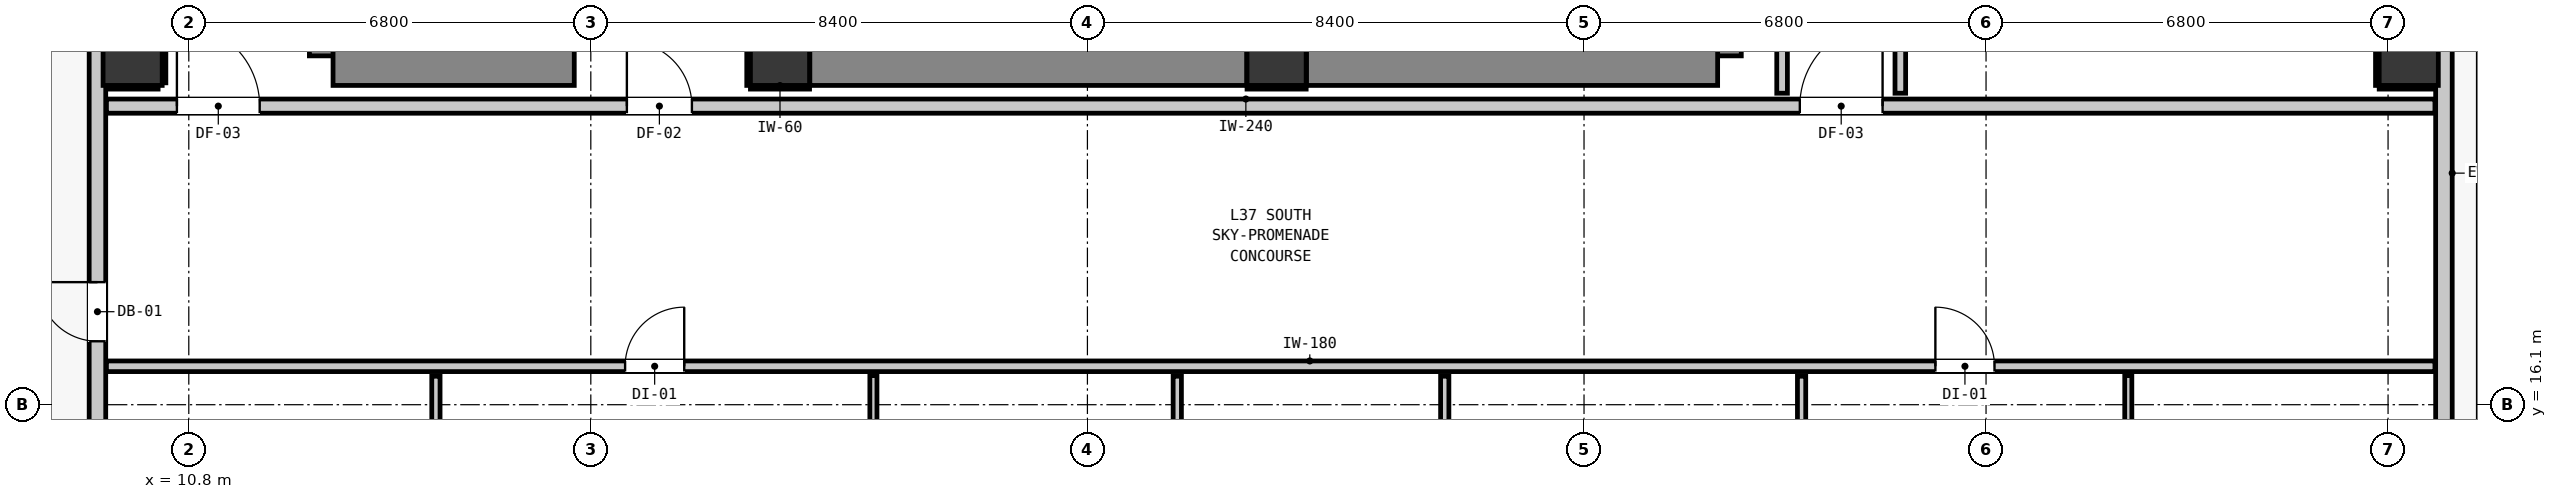
"""IFC4 building model, lengths in metres.
Left out: names, types, materials, properties, quantities, classifications, styles, units other than length and angle.
Written with IfcOpenShell. Run it as: python <this file> out.ifc"""

import sys

from ifc_helpers import new_model, si_unit, direction, frame, frame_2d, origin, origin_2d, place, context, subcontext, project, spatial, rectangle, extrude, element, fill, save


model = new_model("IFC4")
c1 = context("Model", 3, precision=1e-05, world=origin(), true_north=direction((0.0, 1.0)))
c2 = subcontext(c1, "Body", "Model", "MODEL_VIEW")
j1 = project(units=[si_unit("LENGTHUNIT", "METRE"), si_unit("PLANEANGLEUNIT", "RADIAN")], contexts=[c1])
p1 = place(None, origin())
s1 = spatial("IfcSite", under=j1, at=p1, CompositionType="ELEMENT")
p2 = place(p1, origin())
s2 = spatial("IfcBuilding", under=s1, at=p2, CompositionType="ELEMENT")
p3 = place(p2, frame((0.0, 0.0, 129.32)))
s3 = spatial("IfcBuildingStorey", under=s2, at=p3, CompositionType="ELEMENT", Elevation=129.32)
for number, where, z_axis, x_axis in (
    (1, (20.8, 22.0, 0.0), (0.0, 0.0, 1.0), (1.0, 0.0, 0.0)),
    (2, (29.2, 22.0, 0.0), (0.0, 0.0, 1.0), (1.0, 0.0, 0.0)),
):
    element("IfcColumn", number, at=place(p3, frame(where, z_axis=z_axis, x_axis=x_axis)), inside=s3, PredefinedType="COLUMN", context=c2, shape_type="SweptSolid", body=[
        extrude(rectangle(XDim=1.0, YDim=1.0, at=origin_2d()), origin(), (0.0, 0.0, 1.0), 3.32),
    ])
p4 = place(p3, frame((13.34, 22.0, 0.0), z_axis=(0.0, 0.0, 1.0), x_axis=(0.0, 1.0, 0.0)))
e3 = element("IfcWall", 3, at=p4, inside=s3, PredefinedType="SHEAR", context=c2, shape_type="SweptSolid", body=[
    extrude(rectangle(XDim=8.195, YDim=1.0, at=frame_2d((4.098, 0.0))), origin(), (0.0, 0.0, 1.0), 3.32),
])
p5 = place(p3, frame((13.24, 22.0, 0.0), z_axis=(0.0, 0.0, 1.0), x_axis=(1.0, 0.0, 0.0)))
e4 = element("IfcWall", 4, at=p5, inside=s3, PredefinedType="SHEAR", context=c2, shape_type="SweptSolid", body=[
    extrude(rectangle(XDim=4.08, YDim=1.0, at=frame_2d((2.04, 0.0))), origin(), (0.0, 0.0, 1.0), 3.32),
])
p6 = place(p3, frame((36.56, 22.0, 0.0), z_axis=(0.0, 0.0, 1.0), x_axis=(0.0, 1.0, 0.0)))
e5 = element("IfcWall", 5, at=p6, inside=s3, PredefinedType="SHEAR", context=c2, shape_type="SweptSolid", body=[
    extrude(rectangle(XDim=8.195, YDim=1.0, at=frame_2d((4.098, 0.0))), origin(), (0.0, 0.0, 1.0), 3.32),
])
p7 = place(p3, frame((29.705, 22.0, 0.0), z_axis=(0.0, 0.0, 1.0), x_axis=(1.0, 0.0, 0.0)))
e6 = element("IfcWall", 6, at=p7, inside=s3, PredefinedType="SHEAR", context=c2, shape_type="SweptSolid", body=[
    extrude(rectangle(XDim=6.955, YDim=1.0, at=frame_2d((3.478, 0.0))), origin(), (0.0, 0.0, 1.0), 3.32),
])
p8 = place(p3, frame((21.305, 22.0, 0.0), z_axis=(0.0, 0.0, 1.0), x_axis=(1.0, 0.0, 0.0)))
e7 = element("IfcWall", 7, at=p8, inside=s3, PredefinedType="SHEAR", context=c2, shape_type="SweptSolid", body=[
    extrude(rectangle(XDim=7.39, YDim=1.0, at=frame_2d((3.695, 0.0))), origin(), (0.0, 0.0, 1.0), 3.32),
])
for number, where, z_axis, x_axis in (
    (8, (9.85, 22.0, 0.0), (0.0, 0.0, 1.0), (1.0, 0.0, 0.0)),
    (9, (48.35, 22.0, 0.0), (0.0, 0.0, 1.0), (1.0, 0.0, 0.0)),
):
    element("IfcColumn", number, at=place(p3, frame(where, z_axis=z_axis, x_axis=x_axis)), inside=s3, PredefinedType="COLUMN", context=c2, shape_type="SweptSolid", body=[
        extrude(rectangle(XDim=1.0, YDim=1.0, at=origin_2d()), origin(), (0.0, 0.0, 1.0), 3.32),
    ])
p9 = place(p3, frame((9.255, 11.355, 0.0), z_axis=(0.0, 0.0, 1.0), x_axis=(0.0, 1.0, 0.0)))
e10 = element("IfcWall", 10, at=p9, inside=s3, PredefinedType="STANDARD", context=c2, shape_type="SweptSolid", body=[
    extrude(rectangle(XDim=32.29, YDim=0.28, at=frame_2d((16.145, 0.0))), origin(), (0.0, 0.0, 1.0), 3.08),
])
p10 = place(p9, frame((5.818, 0.0, 0.0)))
e11 = element("IfcOpeningElement", 11, at=p10, cuts=e10, PredefinedType="OPENING", context=c2, shape_type="SweptSolid", body=[
    extrude(rectangle(XDim=1.0, YDim=2.15, at=frame_2d((0.5, 1.075))), frame((0.0, 0.15, 0.0), z_axis=(0.0, -1.0, 0.0), x_axis=(1.0, 0.0, 0.0)), (0.0, 0.0, 1.0), 0.3),
])
p11 = place(p9, frame((0.544, 0.0, 0.85)))
e12 = element("IfcOpeningElement", 12, at=p11, cuts=e10, PredefinedType="OPENING", context=c2, shape_type="SweptSolid", body=[
    extrude(rectangle(XDim=1.05, YDim=1.65, at=frame_2d((0.525, 0.825))), frame((0.0, 0.15, 0.0), z_axis=(0.0, -1.0, 0.0), x_axis=(1.0, 0.0, 0.0)), (0.0, 0.0, 1.0), 0.3),
])
p12 = place(p3, frame((48.945, 43.645, 0.0), z_axis=(0.0, 0.0, 1.0), x_axis=(0.0, -1.0, 0.0)))
e13 = element("IfcWall", 13, at=p12, inside=s3, PredefinedType="STANDARD", context=c2, shape_type="SweptSolid", body=[
    extrude(rectangle(XDim=32.29, YDim=0.28, at=frame_2d((16.145, 0.0))), origin(), (0.0, 0.0, 1.0), 3.08),
])
p13 = place(p12, frame((5.467, 0.0, 0.0)))
e14 = element("IfcOpeningElement", 14, at=p13, cuts=e13, PredefinedType="OPENING", context=c2, shape_type="SweptSolid", body=[
    extrude(rectangle(XDim=1.0, YDim=2.15, at=frame_2d((0.5, 1.075))), frame((0.0, 0.15, 0.0), z_axis=(0.0, -1.0, 0.0), x_axis=(1.0, 0.0, 0.0)), (0.0, 0.0, 1.0), 0.3),
])
p14 = place(p12, frame((30.696, 0.0, 0.85)))
e15 = element("IfcOpeningElement", 15, at=p14, cuts=e13, PredefinedType="OPENING", context=c2, shape_type="SweptSolid", body=[
    extrude(rectangle(XDim=1.05, YDim=1.65, at=frame_2d((0.525, 0.825))), frame((0.0, 0.15, 0.0), z_axis=(0.0, -1.0, 0.0), x_axis=(1.0, 0.0, 0.0)), (0.0, 0.0, 1.0), 0.3),
])
p15 = place(p12, frame((14.761, 0.0, 0.85)))
e16 = element("IfcOpeningElement", 16, at=p15, cuts=e13, PredefinedType="OPENING", context=c2, shape_type="SweptSolid", body=[
    extrude(rectangle(XDim=1.8, YDim=1.9, at=frame_2d((0.9, 0.95))), frame((0.0, 0.15, 0.0), z_axis=(0.0, -1.0, 0.0), x_axis=(1.0, 0.0, 0.0)), (0.0, 0.0, 1.0), 0.3),
])
p16 = place(p12, frame((7.106, 0.0, 0.85)))
e17 = element("IfcOpeningElement", 17, at=p16, cuts=e13, PredefinedType="OPENING", context=c2, shape_type="SweptSolid", body=[
    extrude(rectangle(XDim=1.05, YDim=1.65, at=frame_2d((0.525, 0.825))), frame((0.0, 0.15, 0.0), z_axis=(0.0, -1.0, 0.0), x_axis=(1.0, 0.0, 0.0)), (0.0, 0.0, 1.0), 0.3),
])
p17 = place(p3, frame((9.407, 21.15, 0.0), z_axis=(0.0, 0.0, 1.0), x_axis=(1.0, 0.0, 0.0)))
e18 = element("IfcWall", 18, at=p17, inside=s3, PredefinedType="PARTITIONING", context=c2, shape_type="SweptSolid", body=[
    extrude(rectangle(XDim=39.386, YDim=0.24, at=frame_2d((19.693, 0.0))), origin(), (0.0, 0.0, 1.0), 3.08),
])
p18 = place(p17, frame((8.803, 0.0, 0.0)))
e19 = element("IfcOpeningElement", 19, at=p18, cuts=e18, PredefinedType="OPENING", context=c2, shape_type="SweptSolid", body=[
    extrude(rectangle(XDim=1.1, YDim=2.15, at=frame_2d((0.55, 1.075))), frame((0.0, 0.13, 0.0), z_axis=(0.0, -1.0, 0.0), x_axis=(1.0, 0.0, 0.0)), (0.0, 0.0, 1.0), 0.26),
])
p19 = place(p17, frame((1.192, 0.0, 0.0)))
e20 = element("IfcOpeningElement", 20, at=p19, cuts=e18, PredefinedType="OPENING", context=c2, shape_type="SweptSolid", body=[
    extrude(rectangle(XDim=1.4, YDim=2.15, at=frame_2d((0.7, 1.075))), frame((0.0, 0.13, 0.0), z_axis=(0.0, -1.0, 0.0), x_axis=(1.0, 0.0, 0.0)), (0.0, 0.0, 1.0), 0.26),
])
p20 = place(p17, frame((28.643, 0.0, 0.0)))
e21 = element("IfcOpeningElement", 21, at=p20, cuts=e18, PredefinedType="OPENING", context=c2, shape_type="SweptSolid", body=[
    extrude(rectangle(XDim=1.4, YDim=2.15, at=frame_2d((0.7, 1.075))), frame((0.0, 0.13, 0.0), z_axis=(0.0, -1.0, 0.0), x_axis=(1.0, 0.0, 0.0)), (0.0, 0.0, 1.0), 0.26),
])
p21 = place(p3, frame((9.407, 16.75, 0.0), z_axis=(0.0, 0.0, 1.0), x_axis=(1.0, 0.0, 0.0)))
e22 = element("IfcWall", 22, at=p21, inside=s3, PredefinedType="PARTITIONING", context=c2, shape_type="SweptSolid", body=[
    extrude(rectangle(XDim=39.386, YDim=0.18, at=frame_2d((19.693, 0.0))), origin(), (0.0, 0.0, 1.0), 3.08),
])
p22 = place(p21, frame((8.773, 0.0, 0.0)))
e23 = element("IfcOpeningElement", 23, at=p22, cuts=e22, PredefinedType="OPENING", context=c2, shape_type="SweptSolid", body=[
    extrude(rectangle(XDim=1.0, YDim=2.15, at=frame_2d((0.5, 1.075))), frame((0.0, 0.1, 0.0), z_axis=(0.0, -1.0, 0.0), x_axis=(1.0, 0.0, 0.0)), (0.0, 0.0, 1.0), 0.2),
])
p23 = place(p21, frame((30.936, 0.0, 0.0)))
e24 = element("IfcOpeningElement", 24, at=p23, cuts=e22, PredefinedType="OPENING", context=c2, shape_type="SweptSolid", body=[
    extrude(rectangle(XDim=1.0, YDim=2.15, at=frame_2d((0.5, 1.075))), frame((0.0, 0.1, 0.0), z_axis=(0.0, -1.0, 0.0), x_axis=(1.0, 0.0, 0.0)), (0.0, 0.0, 1.0), 0.2),
])
p24 = place(p3, frame((37.75, 21.368, 0.0), z_axis=(0.0, 0.0, 1.0), x_axis=(0.0, 1.0, 0.0)))
e25 = element("IfcWall", 25, at=p24, inside=s3, PredefinedType="PARTITIONING", context=c2, shape_type="SweptSolid", body=[
    extrude(rectangle(XDim=18.694, YDim=0.18, at=frame_2d((9.347, 0.0))), origin(), (0.0, 0.0, 1.0), 3.08),
])
p25 = place(p3, frame((39.75, 21.368, 0.0), z_axis=(0.0, 0.0, 1.0), x_axis=(0.0, 1.0, 0.0)))
e26 = element("IfcWall", 26, at=p25, inside=s3, PredefinedType="PARTITIONING", context=c2, shape_type="SweptSolid", body=[
    extrude(rectangle(XDim=3.964, YDim=0.18, at=frame_2d((1.982, 0.0))), origin(), (0.0, 0.0, 1.0), 3.08),
])
p26 = place(p3, frame((14.98, 13.652, 0.0), z_axis=(0.0, 0.0, 1.0), x_axis=(0.0, 1.0, 0.0)))
e27 = element("IfcWall", 27, at=p26, inside=s3, PredefinedType="PARTITIONING", context=c2, shape_type="SweptSolid", body=[
    extrude(rectangle(XDim=2.93, YDim=0.14, at=frame_2d((1.465, 0.0))), origin(), (0.0, 0.0, 1.0), 3.08),
])
p27 = place(p26, frame((1.032, 0.0, 0.0)))
e28 = element("IfcOpeningElement", 28, at=p27, cuts=e27, PredefinedType="OPENING", context=c2, shape_type="SweptSolid", body=[
    extrude(rectangle(XDim=0.86, YDim=2.02, at=frame_2d((0.43, 1.01))), frame((0.0, 0.08, 0.0), z_axis=(0.0, -1.0, 0.0), x_axis=(1.0, 0.0, 0.0)), (0.0, 0.0, 1.0), 0.16),
])
p28 = place(p3, frame((27.52, 13.652, 0.0), z_axis=(0.0, 0.0, 1.0), x_axis=(0.0, 1.0, 0.0)))
e29 = element("IfcWall", 29, at=p28, inside=s3, PredefinedType="PARTITIONING", context=c2, shape_type="SweptSolid", body=[
    extrude(rectangle(XDim=2.93, YDim=0.14, at=frame_2d((1.465, 0.0))), origin(), (0.0, 0.0, 1.0), 3.08),
])
p29 = place(p28, frame((1.025, 0.0, 0.0)))
e30 = element("IfcOpeningElement", 30, at=p29, cuts=e29, PredefinedType="OPENING", context=c2, shape_type="SweptSolid", body=[
    extrude(rectangle(XDim=0.9, YDim=2.1, at=frame_2d((0.45, 1.05))), frame((0.0, 0.08, 0.0), z_axis=(0.0, -1.0, 0.0), x_axis=(1.0, 0.0, 0.0)), (0.0, 0.0, 1.0), 0.16),
])
p30 = place(p3, frame((32.044, 13.652, 0.0), z_axis=(0.0, 0.0, 1.0), x_axis=(0.0, 1.0, 0.0)))
e31 = element("IfcWall", 31, at=p30, inside=s3, PredefinedType="PARTITIONING", context=c2, shape_type="SweptSolid", body=[
    extrude(rectangle(XDim=2.93, YDim=0.14, at=frame_2d((1.465, 0.0))), origin(), (0.0, 0.0, 1.0), 3.08),
])
p31 = place(p3, frame((38.08, 13.652, 0.0), z_axis=(0.0, 0.0, 1.0), x_axis=(0.0, 1.0, 0.0)))
e32 = element("IfcWall", 32, at=p31, inside=s3, PredefinedType="PARTITIONING", context=c2, shape_type="SweptSolid", body=[
    extrude(rectangle(XDim=2.93, YDim=0.14, at=frame_2d((1.465, 0.0))), origin(), (0.0, 0.0, 1.0), 3.08),
])
p32 = place(p31, frame((1.032, 0.0, 0.0)))
e33 = element("IfcOpeningElement", 33, at=p32, cuts=e32, PredefinedType="OPENING", context=c2, shape_type="SweptSolid", body=[
    extrude(rectangle(XDim=0.86, YDim=2.02, at=frame_2d((0.43, 1.01))), frame((0.0, 0.08, 0.0), z_axis=(0.0, -1.0, 0.0), x_axis=(1.0, 0.0, 0.0)), (0.0, 0.0, 1.0), 0.16),
])
p33 = place(p3, frame((22.38, 13.642, 0.0), z_axis=(0.0, 0.0, 1.0), x_axis=(0.0, 1.0, 0.0)))
e34 = element("IfcWall", 34, at=p33, inside=s3, PredefinedType="PARTITIONING", context=c2, shape_type="SweptSolid", body=[
    extrude(rectangle(XDim=2.95, YDim=0.12, at=frame_2d((1.475, 0.0))), origin(), (0.0, 0.0, 1.0), 3.08),
])
p34 = place(p33, frame((1.022, 0.0, 0.0)))
e35 = element("IfcOpeningElement", 35, at=p34, cuts=e34, PredefinedType="OPENING", context=c2, shape_type="SweptSolid", body=[
    extrude(rectangle(XDim=0.9, YDim=2.1, at=frame_2d((0.45, 1.05))), frame((0.0, 0.07, 0.0), z_axis=(0.0, -1.0, 0.0), x_axis=(1.0, 0.0, 0.0)), (0.0, 0.0, 1.0), 0.14),
])
p35 = place(p3, frame((43.606, 13.642, 0.0), z_axis=(0.0, 0.0, 1.0), x_axis=(0.0, 1.0, 0.0)))
e36 = element("IfcWall", 36, at=p35, inside=s3, PredefinedType="PARTITIONING", context=c2, shape_type="SweptSolid", body=[
    extrude(rectangle(XDim=2.95, YDim=0.12, at=frame_2d((1.475, 0.0))), origin(), (0.0, 0.0, 1.0), 3.08),
])
p36 = place(p35, frame((1.022, 0.0, 0.0)))
e37 = element("IfcOpeningElement", 37, at=p36, cuts=e36, PredefinedType="OPENING", context=c2, shape_type="SweptSolid", body=[
    extrude(rectangle(XDim=0.9, YDim=2.1, at=frame_2d((0.45, 1.05))), frame((0.0, 0.07, 0.0), z_axis=(0.0, -1.0, 0.0), x_axis=(1.0, 0.0, 0.0)), (0.0, 0.0, 1.0), 0.14),
])
for number, where, z_axis, x_axis in (
    (38, (20.3, 21.468, 0.0), (0.0, 0.0, 1.0), (1.0, 0.0, 0.0)),
    (39, (20.268, 21.5, 0.0), (0.0, 0.0, 1.0), (0.0, 1.0, 0.0)),
    (40, (28.7, 21.468, 0.0), (0.0, 0.0, 1.0), (1.0, 0.0, 0.0)),
):
    element("IfcWall", number, at=place(p3, frame(where, z_axis=z_axis, x_axis=x_axis)), inside=s3, PredefinedType="PARTITIONING", context=c2, shape_type="SweptSolid", body=[
        extrude(rectangle(XDim=1.0, YDim=0.06, at=frame_2d((0.5, 0.0))), origin(), (0.0, 0.0, 1.0), 1.45),
    ])
p37 = place(p3, frame((9.41, 21.468, 0.0), z_axis=(0.0, 0.0, 1.0), x_axis=(1.0, 0.0, 0.0)))
e41 = element("IfcWall", 41, at=p37, inside=s3, PredefinedType="PARTITIONING", context=c2, shape_type="SweptSolid", body=[
    extrude(rectangle(XDim=0.871, YDim=0.06, at=frame_2d((0.436, 0.0))), origin(), (0.0, 0.0, 1.0), 1.45),
])
p38 = place(p3, frame((10.382, 21.544, 0.0), z_axis=(0.0, 0.0, 1.0), x_axis=(0.0, 1.0, 0.0)))
e42 = element("IfcWall", 42, at=p38, inside=s3, PredefinedType="PARTITIONING", context=c2, shape_type="SweptSolid", body=[
    extrude(rectangle(XDim=0.956, YDim=0.06, at=frame_2d((0.478, 0.0))), origin(), (0.0, 0.0, 1.0), 1.45),
])
p39 = place(p3, frame((47.85, 21.468, 0.0), z_axis=(0.0, 0.0, 1.0), x_axis=(1.0, 0.0, 0.0)))
e43 = element("IfcWall", 43, at=p39, inside=s3, PredefinedType="PARTITIONING", context=c2, shape_type="SweptSolid", body=[
    extrude(rectangle(XDim=0.94, YDim=0.06, at=frame_2d((0.47, 0.0))), origin(), (0.0, 0.0, 1.0), 1.45),
])
p40 = place(p3, frame((47.818, 21.5, 0.0), z_axis=(0.0, 0.0, 1.0), x_axis=(0.0, 1.0, 0.0)))
e44 = element("IfcWall", 44, at=p40, inside=s3, PredefinedType="PARTITIONING", context=c2, shape_type="SweptSolid", body=[
    extrude(rectangle(XDim=1.0, YDim=0.06, at=frame_2d((0.5, 0.0))), origin(), (0.0, 0.0, 1.0), 1.45),
])
p41 = place(p10, origin())
e45 = element("IfcDoor", 45, at=p41, inside=s3, OperationType="SINGLE_SWING_RIGHT", PredefinedType="DOOR", context=c2, shape_type="SweptSolid", body=[
    extrude(rectangle(XDim=1.0, YDim=2.15, at=frame_2d((0.5, 1.075))), frame((0.0, 0.025, 0.0), z_axis=(0.0, -1.0, 0.0), x_axis=(1.0, 0.0, 0.0)), (0.0, 0.0, 1.0), 0.05),
])
fill(e11, e45)
p42 = place(p18, origin())
e46 = element("IfcDoor", 46, at=p42, inside=s3, OperationType="SINGLE_SWING_LEFT", PredefinedType="DOOR", context=c2, shape_type="SweptSolid", body=[
    extrude(rectangle(XDim=1.1, YDim=2.15, at=frame_2d((0.55, 1.075))), frame((0.0, 0.025, 0.0), z_axis=(0.0, -1.0, 0.0), x_axis=(1.0, 0.0, 0.0)), (0.0, 0.0, 1.0), 0.05),
])
fill(e19, e46)
p43 = place(p19, origin())
e47 = element("IfcDoor", 47, at=p43, inside=s3, OperationType="SINGLE_SWING_LEFT", PredefinedType="DOOR", context=c2, shape_type="SweptSolid", body=[
    extrude(rectangle(XDim=1.4, YDim=2.15, at=frame_2d((0.7, 1.075))), frame((0.0, 0.025, 0.0), z_axis=(0.0, -1.0, 0.0), x_axis=(1.0, 0.0, 0.0)), (0.0, 0.0, 1.0), 0.05),
])
fill(e20, e47)
p44 = place(p20, origin())
e48 = element("IfcDoor", 48, at=p44, inside=s3, OperationType="SINGLE_SWING_RIGHT", PredefinedType="DOOR", context=c2, shape_type="SweptSolid", body=[
    extrude(rectangle(XDim=1.4, YDim=2.15, at=frame_2d((0.7, 1.075))), frame((0.0, 0.025, 0.0), z_axis=(0.0, -1.0, 0.0), x_axis=(1.0, 0.0, 0.0)), (0.0, 0.0, 1.0), 0.05),
])
fill(e21, e48)
p45 = place(p22, origin())
e49 = element("IfcDoor", 49, at=p45, inside=s3, OperationType="SINGLE_SWING_RIGHT", PredefinedType="DOOR", context=c2, shape_type="SweptSolid", body=[
    extrude(rectangle(XDim=1.0, YDim=2.15, at=frame_2d((0.5, 1.075))), frame((0.0, 0.025, 0.0), z_axis=(0.0, -1.0, 0.0), x_axis=(1.0, 0.0, 0.0)), (0.0, 0.0, 1.0), 0.05),
])
fill(e23, e49)
p46 = place(p23, origin())
e50 = element("IfcDoor", 50, at=p46, inside=s3, OperationType="SINGLE_SWING_LEFT", PredefinedType="DOOR", context=c2, shape_type="SweptSolid", body=[
    extrude(rectangle(XDim=1.0, YDim=2.15, at=frame_2d((0.5, 1.075))), frame((0.0, 0.025, 0.0), z_axis=(0.0, -1.0, 0.0), x_axis=(1.0, 0.0, 0.0)), (0.0, 0.0, 1.0), 0.05),
])
fill(e24, e50)
save(model, sys.argv[1])
